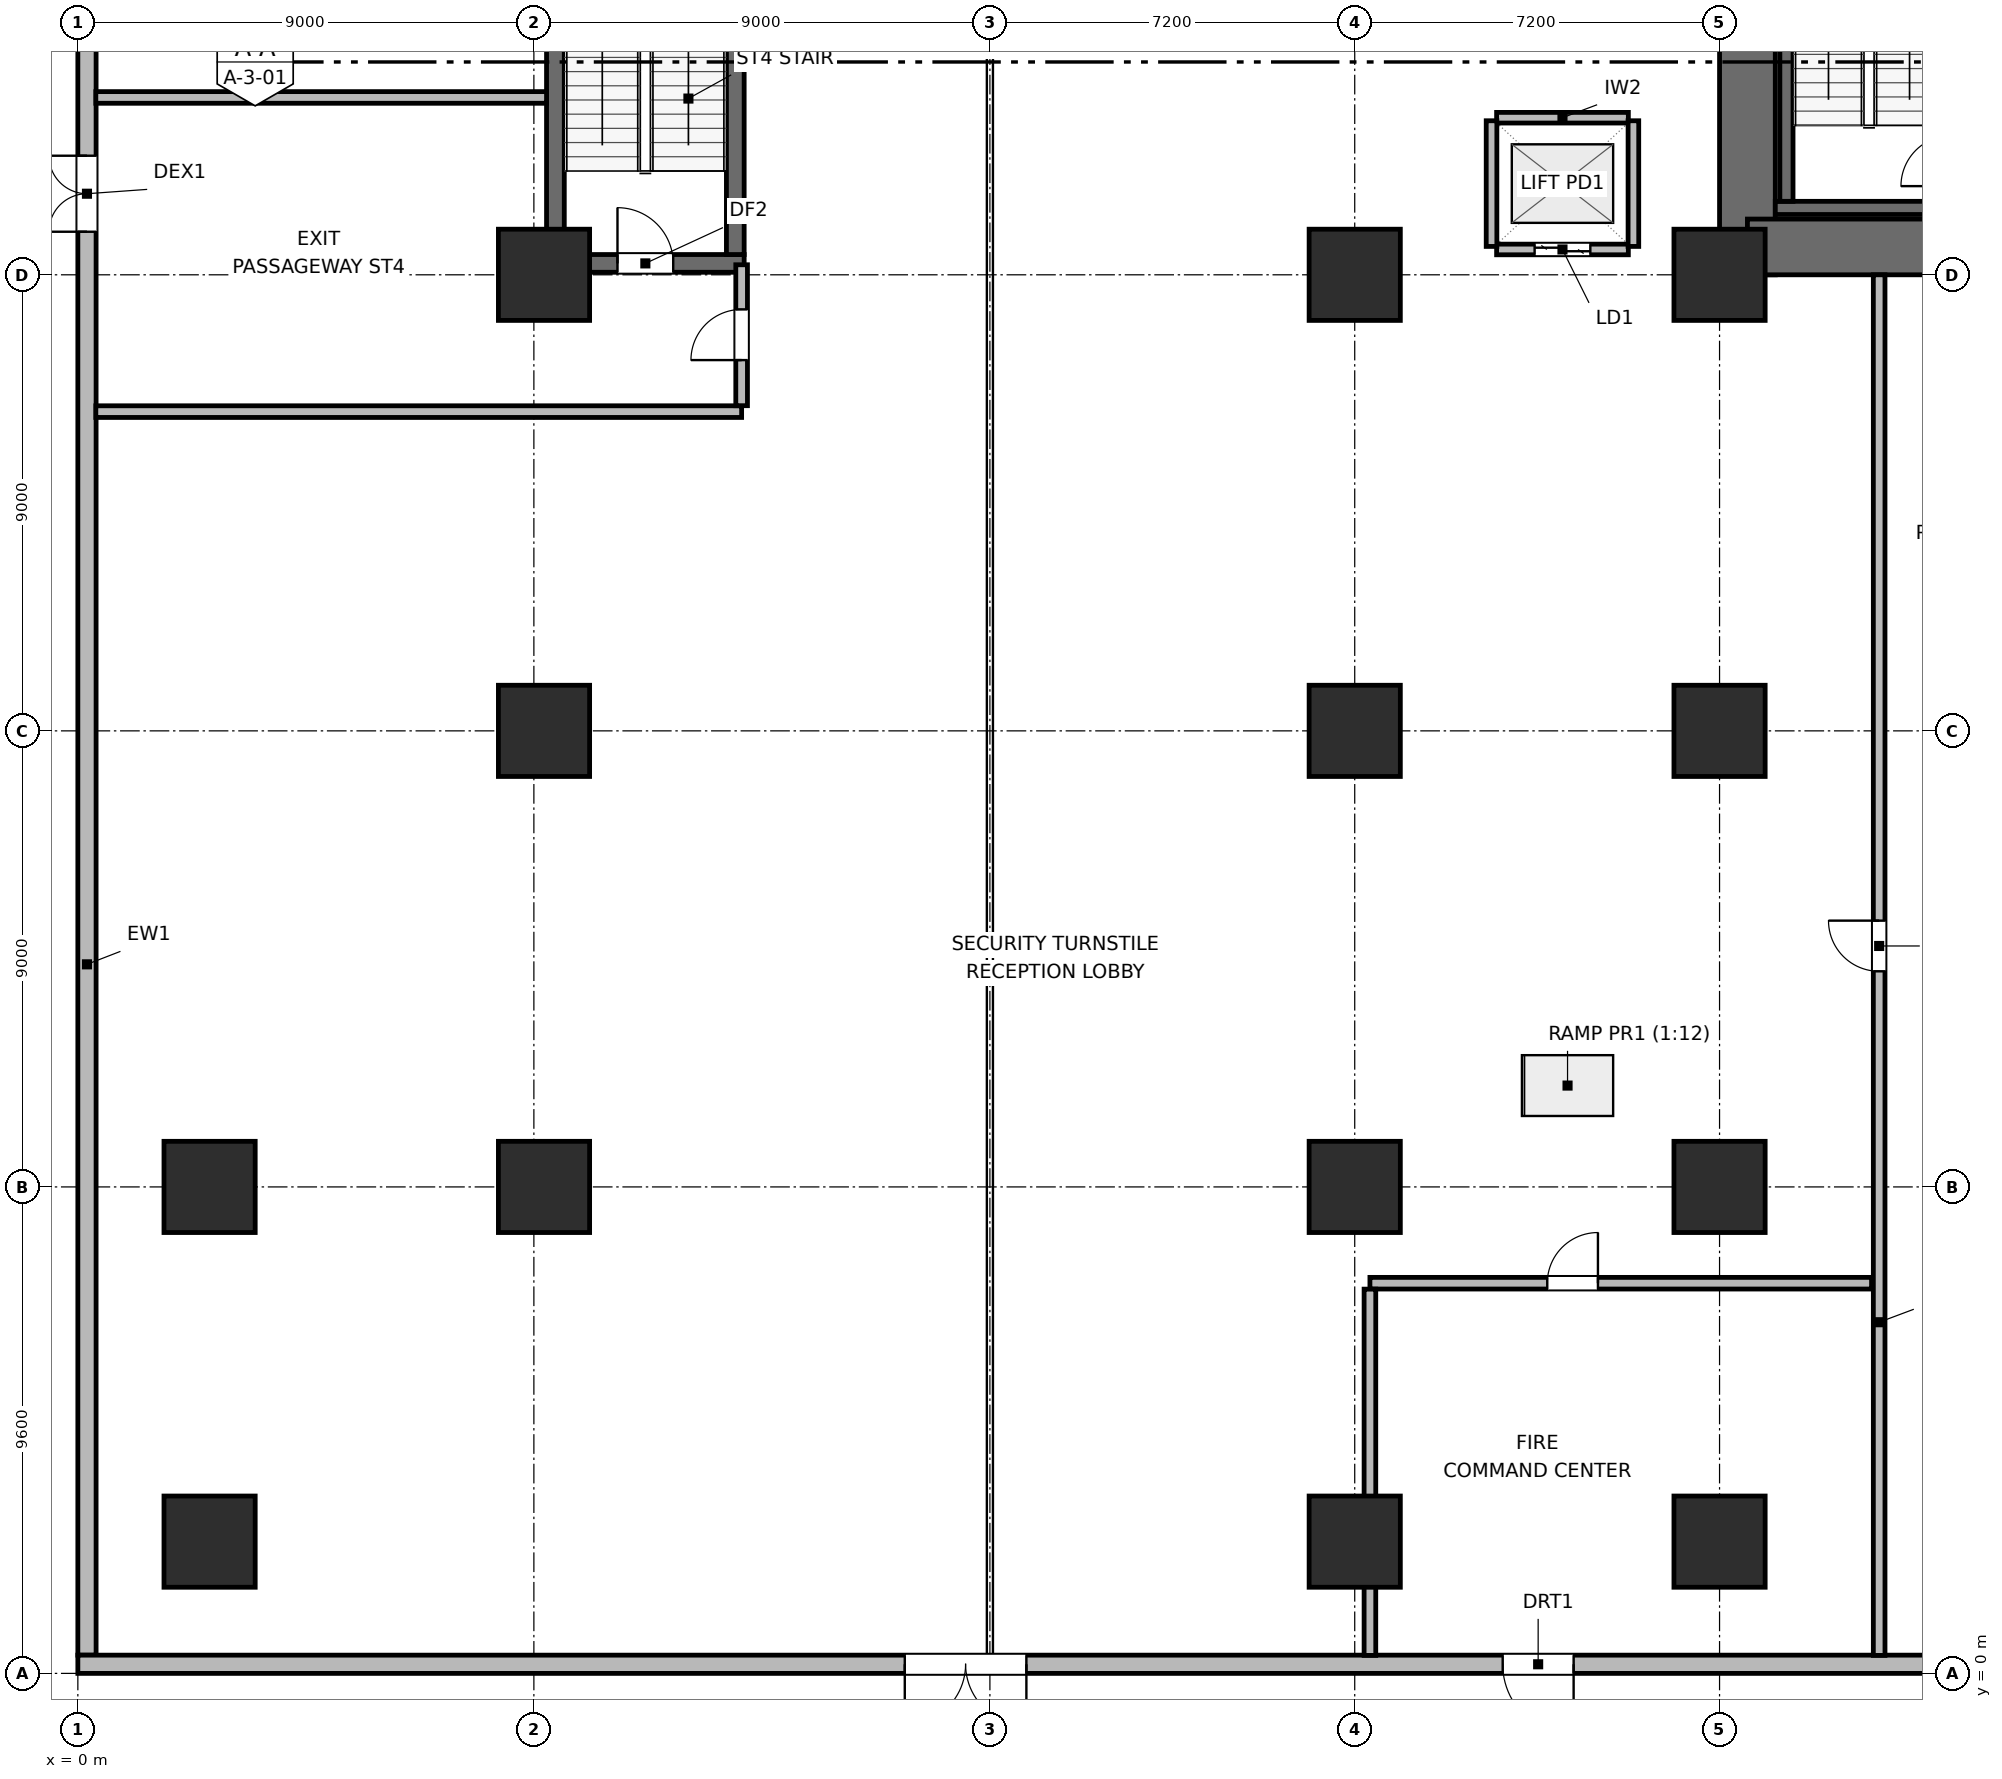
"""IFC4 building model, lengths in metres.
Left out: names, types, materials, properties, quantities, classifications, styles, units other than length and angle.
Written with IfcOpenShell. Run it as: python <this file> out.ifc"""

import sys

from ifc_helpers import new_model, si_unit, direction, frame, frame_2d, origin, origin_2d, place, context, subcontext, project, spatial, rectangle, extrude, element, fill, save


model = new_model("IFC4")
c1 = context("Model", 3, precision=1e-05, world=origin(), true_north=direction((0.0, 1.0)))
c2 = subcontext(c1, "Body", "Model", "MODEL_VIEW")
j1 = project(units=[si_unit("LENGTHUNIT", "METRE"), si_unit("PLANEANGLEUNIT", "RADIAN")], contexts=[c1])
p1 = place(None, origin())
s1 = spatial("IfcSite", under=j1, at=p1, CompositionType="ELEMENT")
p2 = place(p1, origin())
s2 = spatial("IfcBuilding", under=s1, at=p2, CompositionType="ELEMENT")
p3 = place(p2, origin())
s3 = spatial("IfcBuildingStorey", under=s2, at=p3, CompositionType="ELEMENT", Elevation=0.0)
p4 = place(p3, frame((32.95, 27.6, 0.0), z_axis=(0.0, 0.0, 1.0), x_axis=(0.0, 1.0, 0.0)))
e1 = element("IfcWall", 1, at=p4, inside=s3, PredefinedType="SHEAR", context=c2, shape_type="SweptSolid", body=[
    extrude(rectangle(XDim=16.8, YDim=1.1, at=frame_2d((8.4, 0.0))), origin(), (0.0, 0.0, 1.0), 4.5),
])
p5 = place(p3, frame((32.95, 28.15, 0.0), z_axis=(0.0, 0.0, 1.0), x_axis=(1.0, 0.0, 0.0)))
e2 = element("IfcWall", 2, at=p5, inside=s3, PredefinedType="SHEAR", context=c2, shape_type="SweptSolid", body=[
    extrude(rectangle(XDim=8.9, YDim=1.1, at=frame_2d((4.45, 0.0))), origin(), (0.0, 0.0, 1.0), 4.5),
])
p6 = place(p5, frame((4.9, 0.0, 0.0)))
e3 = element("IfcOpeningElement", 3, at=p6, cuts=e2, PredefinedType="OPENING", context=c2, shape_type="SweptSolid", body=[
    extrude(rectangle(XDim=1.05, YDim=2.04, at=frame_2d((0.525, 1.02))), frame((0.0, 0.56, 0.0), z_axis=(0.0, -1.0, 0.0), x_axis=(1.0, 0.0, 0.0)), (0.0, 0.0, 1.0), 1.12),
])
p7 = place(p3, frame((33.5, 28.92, 0.0), z_axis=(0.0, 0.0, 1.0), x_axis=(1.0, 0.0, 0.0)))
e4 = element("IfcWall", 4, at=p7, inside=s3, PredefinedType="SHEAR", context=c2, shape_type="SweptSolid", body=[
    extrude(rectangle(XDim=3.61, YDim=0.26, at=frame_2d((1.805, 0.0))), origin(), (0.0, 0.0, 1.0), 4.5),
])
p8 = place(p3, frame((33.72, 29.05, 0.0), z_axis=(0.0, 0.0, 1.0), x_axis=(0.0, 1.0, 0.0)))
e5 = element("IfcWall", 5, at=p8, inside=s3, PredefinedType="SHEAR", context=c2, shape_type="SweptSolid", body=[
    extrude(rectangle(XDim=7.6, YDim=0.26, at=frame_2d((3.8, 0.0))), origin(), (0.0, 0.0, 1.0), 4.5),
])
p9 = place(p3, frame((9.25, 27.825, 0.0), z_axis=(0.0, 0.0, 1.0), x_axis=(1.0, 0.0, 0.0)))
e6 = element("IfcWall", 6, at=p9, inside=s3, PredefinedType="SHEAR", context=c2, shape_type="SweptSolid", body=[
    extrude(rectangle(XDim=3.9, YDim=0.35, at=frame_2d((1.95, 0.0))), origin(), (0.0, 0.0, 1.0), 4.5),
])
p10 = place(p9, frame((1.4, 0.0, 0.0)))
e7 = element("IfcOpeningElement", 7, at=p10, cuts=e6, PredefinedType="OPENING", context=c2, shape_type="SweptSolid", body=[
    extrude(rectangle(XDim=1.1, YDim=2.05, at=frame_2d((0.55, 1.025))), frame((0.0, 0.185, 0.0), z_axis=(0.0, -1.0, 0.0), x_axis=(1.0, 0.0, 0.0)), (0.0, 0.0, 1.0), 0.37),
])
for number, where, z_axis, x_axis in (
    (8, (9.425, 28.0, 0.0), (0.0, 0.0, 1.0), (0.0, 1.0, 0.0)),
    (9, (12.975, 28.0, 0.0), (0.0, 0.0, 1.0), (0.0, 1.0, 0.0)),
):
    element("IfcWall", number, at=place(p3, frame(where, z_axis=z_axis, x_axis=x_axis)), inside=s3, PredefinedType="SHEAR", context=c2, shape_type="SweptSolid", body=[
        extrude(rectangle(XDim=8.4, YDim=0.35, at=frame_2d((4.2, 0.0))), origin(), (0.0, 0.0, 1.0), 4.5),
    ])
for number, where, z_axis, x_axis in (
    (10, (2.6, 2.6, 0.0), (0.0, 0.0, 1.0), (1.0, 0.0, 0.0)),
    (11, (2.6, 9.6, 0.0), (0.0, 0.0, 1.0), (1.0, 0.0, 0.0)),
    (12, (9.2, 9.6, 0.0), (0.0, 0.0, 1.0), (1.0, 0.0, 0.0)),
    (13, (9.2, 18.6, 0.0), (0.0, 0.0, 1.0), (1.0, 0.0, 0.0)),
    (14, (9.2, 27.6, 0.0), (0.0, 0.0, 1.0), (1.0, 0.0, 0.0)),
    (15, (25.2, 2.6, 0.0), (0.0, 0.0, 1.0), (1.0, 0.0, 0.0)),
    (16, (25.2, 9.6, 0.0), (0.0, 0.0, 1.0), (1.0, 0.0, 0.0)),
    (17, (25.2, 18.6, 0.0), (0.0, 0.0, 1.0), (1.0, 0.0, 0.0)),
    (18, (25.2, 27.6, 0.0), (0.0, 0.0, 1.0), (1.0, 0.0, 0.0)),
    (19, (32.4, 2.6, 0.0), (0.0, 0.0, 1.0), (1.0, 0.0, 0.0)),
    (20, (32.4, 9.6, 0.0), (0.0, 0.0, 1.0), (1.0, 0.0, 0.0)),
    (21, (32.4, 18.6, 0.0), (0.0, 0.0, 1.0), (1.0, 0.0, 0.0)),
    (22, (32.4, 27.6, 0.0), (0.0, 0.0, 1.0), (1.0, 0.0, 0.0)),
):
    element("IfcColumn", number, at=place(p3, frame(where, z_axis=z_axis, x_axis=x_axis)), inside=s3, PredefinedType="COLUMN", context=c2, shape_type="SweptSolid", body=[
        extrude(rectangle(XDim=1.8, YDim=1.8, at=origin_2d()), origin(), (0.0, 0.0, 1.0), 4.5),
    ])
p11 = place(p3, frame((0.18, 0.36, 0.0), z_axis=(0.0, 0.0, 1.0), x_axis=(0.0, 1.0, 0.0)))
e23 = element("IfcWall", 23, at=p11, inside=s3, PredefinedType="SOLIDWALL", context=c2, shape_type="SweptSolid", body=[
    extrude(rectangle(XDim=71.28, YDim=0.36, at=frame_2d((35.64, 0.0))), origin(), (0.0, 0.0, 1.0), 4.18),
])
p12 = place(p11, frame((28.09, 0.0, 0.0)))
e24 = element("IfcOpeningElement", 24, at=p12, cuts=e23, PredefinedType="OPENING", context=c2, shape_type="SweptSolid", body=[
    extrude(rectangle(XDim=1.5, YDim=2.15, at=frame_2d((0.75, 1.075))), frame((0.0, 0.19, 0.0), z_axis=(0.0, -1.0, 0.0), x_axis=(1.0, 0.0, 0.0)), (0.0, 0.0, 1.0), 0.38),
])
p13 = place(p3, frame((39.72, 0.18, 0.0), z_axis=(0.0, 0.0, 1.0), x_axis=(-1.0, 0.0, 0.0)))
e25 = element("IfcWall", 25, at=p13, inside=s3, PredefinedType="SOLIDWALL", context=c2, shape_type="SweptSolid", body=[
    extrude(rectangle(XDim=39.72, YDim=0.36, at=frame_2d((19.86, 0.0))), origin(), (0.0, 0.0, 1.0), 4.18),
])
p14 = place(p13, frame((1.2, 0.0, 0.0)))
e26 = element("IfcOpeningElement", 26, at=p14, cuts=e25, PredefinedType="OPENING", context=c2, shape_type="SweptSolid", body=[
    extrude(rectangle(XDim=1.5, YDim=2.15, at=frame_2d((0.75, 1.075))), frame((0.0, 0.19, 0.0), z_axis=(0.0, -1.0, 0.0), x_axis=(1.0, 0.0, 0.0)), (0.0, 0.0, 1.0), 0.38),
])
p15 = place(p13, frame((21.0, 0.0, 0.0)))
e27 = element("IfcOpeningElement", 27, at=p15, cuts=e25, PredefinedType="OPENING", context=c2, shape_type="SweptSolid", body=[
    extrude(rectangle(XDim=2.4, YDim=2.4, at=frame_2d((1.2, 1.2))), frame((0.0, 0.19, 0.0), z_axis=(0.0, -1.0, 0.0), x_axis=(1.0, 0.0, 0.0)), (0.0, 0.0, 1.0), 0.38),
])
p16 = place(p13, frame((10.2, 0.0, 0.0)))
e28 = element("IfcOpeningElement", 28, at=p16, cuts=e25, PredefinedType="OPENING", context=c2, shape_type="SweptSolid", body=[
    extrude(rectangle(XDim=1.4, YDim=2.15, at=frame_2d((0.7, 1.075))), frame((0.0, 0.19, 0.0), z_axis=(0.0, -1.0, 0.0), x_axis=(1.0, 0.0, 0.0)), (0.0, 0.0, 1.0), 0.38),
])
p17 = place(p3, frame((28.0, 28.1, 0.0), z_axis=(0.0, 0.0, 1.0), x_axis=(1.0, 0.0, 0.0)))
e29 = element("IfcWall", 29, at=p17, inside=s3, PredefinedType="PARTITIONING", context=c2, shape_type="SweptSolid", body=[
    extrude(rectangle(XDim=2.6, YDim=0.21, at=frame_2d((1.3, 0.0))), origin(), (0.0, 0.0, 1.0), 4.18),
])
p18 = place(p17, frame((0.75, 0.0, 0.0)))
e30 = element("IfcOpeningElement", 30, at=p18, cuts=e29, PredefinedType="OPENING", context=c2, shape_type="SweptSolid", body=[
    extrude(rectangle(XDim=1.1, YDim=2.04, at=frame_2d((0.55, 1.02))), frame((0.0, 0.115, 0.0), z_axis=(0.0, -1.0, 0.0), x_axis=(1.0, 0.0, 0.0)), (0.0, 0.0, 1.0), 0.23),
])
p19 = place(p3, frame((28.0, 30.7, 0.0), z_axis=(0.0, 0.0, 1.0), x_axis=(1.0, 0.0, 0.0)))
e31 = element("IfcWall", 31, at=p19, inside=s3, PredefinedType="PARTITIONING", context=c2, shape_type="SweptSolid", body=[
    extrude(rectangle(XDim=2.6, YDim=0.21, at=frame_2d((1.3, 0.0))), origin(), (0.0, 0.0, 1.0), 4.18),
])
for number, where, z_axis, x_axis in (
    (32, (27.9, 28.16, 0.0), (0.0, 0.0, 1.0), (0.0, 1.0, 0.0)),
    (33, (30.7, 28.16, 0.0), (0.0, 0.0, 1.0), (0.0, 1.0, 0.0)),
):
    element("IfcWall", number, at=place(p3, frame(where, z_axis=z_axis, x_axis=x_axis)), inside=s3, PredefinedType="PARTITIONING", context=c2, shape_type="SweptSolid", body=[
        extrude(rectangle(XDim=2.48, YDim=0.21, at=frame_2d((1.24, 0.0))), origin(), (0.0, 0.0, 1.0), 4.18),
    ])
p20 = place(p3, frame((35.55, 0.355, 0.0), z_axis=(0.0, 0.0, 1.0), x_axis=(0.0, 1.0, 0.0)))
e34 = element("IfcWall", 34, at=p20, inside=s3, PredefinedType="PARTITIONING", context=c2, shape_type="SweptSolid", body=[
    extrude(rectangle(XDim=27.245, YDim=0.23, at=frame_2d((13.623, 0.0))), origin(), (0.0, 0.0, 1.0), 4.18),
])
p21 = place(p20, frame((13.5, 0.0, 0.0)))
e35 = element("IfcOpeningElement", 35, at=p21, cuts=e34, PredefinedType="OPENING", context=c2, shape_type="SweptSolid", body=[
    extrude(rectangle(XDim=1.0, YDim=2.04, at=frame_2d((0.5, 1.02))), frame((0.0, 0.125, 0.0), z_axis=(0.0, -1.0, 0.0), x_axis=(1.0, 0.0, 0.0)), (0.0, 0.0, 1.0), 0.25),
])
p22 = place(p3, frame((0.355, 24.9, 0.0), z_axis=(0.0, 0.0, 1.0), x_axis=(1.0, 0.0, 0.0)))
e36 = element("IfcWall", 36, at=p22, inside=s3, PredefinedType="PARTITIONING", context=c2, shape_type="SweptSolid", body=[
    extrude(rectangle(XDim=12.745, YDim=0.23, at=frame_2d((6.373, 0.0))), origin(), (0.0, 0.0, 1.0), 4.18),
])
p23 = place(p3, frame((13.1, 25.017, 0.0), z_axis=(0.0, 0.0, 1.0), x_axis=(0.0, 1.0, 0.0)))
e37 = element("IfcWall", 37, at=p23, inside=s3, PredefinedType="PARTITIONING", context=c2, shape_type="SweptSolid", body=[
    extrude(rectangle(XDim=2.781, YDim=0.23, at=frame_2d((1.391, 0.0))), origin(), (0.0, 0.0, 1.0), 4.18),
])
p24 = place(p23, frame((0.9, 0.0, 0.0)))
e38 = element("IfcOpeningElement", 38, at=p24, cuts=e37, PredefinedType="OPENING", context=c2, shape_type="SweptSolid", body=[
    extrude(rectangle(XDim=1.0, YDim=2.04, at=frame_2d((0.5, 1.02))), frame((0.0, 0.125, 0.0), z_axis=(0.0, -1.0, 0.0), x_axis=(1.0, 0.0, 0.0)), (0.0, 0.0, 1.0), 0.25),
])
p25 = place(p3, frame((0.355, 31.1, 0.0), z_axis=(0.0, 0.0, 1.0), x_axis=(1.0, 0.0, 0.0)))
e39 = element("IfcWall", 39, at=p25, inside=s3, PredefinedType="PARTITIONING", context=c2, shape_type="SweptSolid", body=[
    extrude(rectangle(XDim=8.895, YDim=0.23, at=frame_2d((4.448, 0.0))), origin(), (0.0, 0.0, 1.0), 4.18),
])
p26 = place(p3, frame((25.5, 7.7, 0.0), z_axis=(0.0, 0.0, 1.0), x_axis=(1.0, 0.0, 0.0)))
e40 = element("IfcWall", 40, at=p26, inside=s3, PredefinedType="PARTITIONING", context=c2, shape_type="SweptSolid", body=[
    extrude(rectangle(XDim=9.9, YDim=0.23, at=frame_2d((4.95, 0.0))), origin(), (0.0, 0.0, 1.0), 4.18),
])
p27 = place(p26, frame((3.5, 0.0, 0.0)))
e41 = element("IfcOpeningElement", 41, at=p27, cuts=e40, PredefinedType="OPENING", context=c2, shape_type="SweptSolid", body=[
    extrude(rectangle(XDim=1.0, YDim=2.04, at=frame_2d((0.5, 1.02))), frame((0.0, 0.125, 0.0), z_axis=(0.0, -1.0, 0.0), x_axis=(1.0, 0.0, 0.0)), (0.0, 0.0, 1.0), 0.25),
])
p28 = place(p3, frame((25.5, 0.355, 0.0), z_axis=(0.0, 0.0, 1.0), x_axis=(0.0, 1.0, 0.0)))
e42 = element("IfcWall", 42, at=p28, inside=s3, PredefinedType="PARTITIONING", context=c2, shape_type="SweptSolid", body=[
    extrude(rectangle(XDim=7.228, YDim=0.23, at=frame_2d((3.614, 0.0))), origin(), (0.0, 0.0, 1.0), 3.392),
])
p29 = place(p12, origin())
e43 = element("IfcDoor", 43, at=p29, inside=s3, OperationType="DOUBLE_DOOR_SINGLE_SWING", PredefinedType="DOOR", context=c2, shape_type="SweptSolid", body=[
    extrude(rectangle(XDim=1.5, YDim=2.15, at=frame_2d((0.75, 1.075))), frame((0.0, 0.025, 0.0), z_axis=(0.0, -1.0, 0.0), x_axis=(1.0, 0.0, 0.0)), (0.0, 0.0, 1.0), 0.05),
])
fill(e24, e43)
p30 = place(p15, origin())
e44 = element("IfcDoor", 44, at=p30, inside=s3, OperationType="DOUBLE_DOOR_SINGLE_SWING", PredefinedType="DOOR", context=c2, shape_type="SweptSolid", body=[
    extrude(rectangle(XDim=2.4, YDim=2.4, at=frame_2d((1.2, 1.2))), frame((0.0, 0.025, 0.0), z_axis=(0.0, -1.0, 0.0), x_axis=(1.0, 0.0, 0.0)), (0.0, 0.0, 1.0), 0.05),
])
fill(e27, e44)
p31 = place(p16, origin())
e45 = element("IfcDoor", 45, at=p31, inside=s3, OperationType="SINGLE_SWING_LEFT", PredefinedType="DOOR", context=c2, shape_type="SweptSolid", body=[
    extrude(rectangle(XDim=1.4, YDim=2.15, at=frame_2d((0.7, 1.075))), frame((0.0, 0.025, 0.0), z_axis=(0.0, -1.0, 0.0), x_axis=(1.0, 0.0, 0.0)), (0.0, 0.0, 1.0), 0.05),
])
fill(e28, e45)
p32 = place(p10, origin())
e46 = element("IfcDoor", 46, at=p32, inside=s3, OperationType="SINGLE_SWING_LEFT", PredefinedType="DOOR", context=c2, shape_type="SweptSolid", body=[
    extrude(rectangle(XDim=1.1, YDim=2.05, at=frame_2d((0.55, 1.025))), frame((0.0, 0.025, 0.0), z_axis=(0.0, -1.0, 0.0), x_axis=(1.0, 0.0, 0.0)), (0.0, 0.0, 1.0), 0.05),
])
fill(e7, e46)
p33 = place(p18, origin())
e47 = element("IfcDoor", 47, at=p33, inside=s3, OperationType="DOUBLE_DOOR_SLIDING", PredefinedType="DOOR", context=c2, shape_type="SweptSolid", body=[
    extrude(rectangle(XDim=1.1, YDim=2.04, at=frame_2d((0.55, 1.02))), frame((0.0, 0.025, 0.0), z_axis=(0.0, -1.0, 0.0), x_axis=(1.0, 0.0, 0.0)), (0.0, 0.0, 1.0), 0.05),
])
fill(e30, e47)
p34 = place(p21, origin())
e48 = element("IfcDoor", 48, at=p34, inside=s3, OperationType="SINGLE_SWING_RIGHT", PredefinedType="DOOR", context=c2, shape_type="SweptSolid", body=[
    extrude(rectangle(XDim=1.0, YDim=2.04, at=frame_2d((0.5, 1.02))), frame((0.0, 0.025, 0.0), z_axis=(0.0, -1.0, 0.0), x_axis=(1.0, 0.0, 0.0)), (0.0, 0.0, 1.0), 0.05),
])
fill(e35, e48)
p35 = place(p24, origin())
e49 = element("IfcDoor", 49, at=p35, inside=s3, OperationType="SINGLE_SWING_LEFT", PredefinedType="DOOR", context=c2, shape_type="SweptSolid", body=[
    extrude(rectangle(XDim=1.0, YDim=2.04, at=frame_2d((0.5, 1.02))), frame((0.0, 0.025, 0.0), z_axis=(0.0, -1.0, 0.0), x_axis=(1.0, 0.0, 0.0)), (0.0, 0.0, 1.0), 0.05),
])
fill(e38, e49)
p36 = place(p27, origin())
e50 = element("IfcDoor", 50, at=p36, inside=s3, OperationType="SINGLE_SWING_RIGHT", PredefinedType="DOOR", context=c2, shape_type="SweptSolid", body=[
    extrude(rectangle(XDim=1.0, YDim=2.04, at=frame_2d((0.5, 1.02))), frame((0.0, 0.025, 0.0), z_axis=(0.0, -1.0, 0.0), x_axis=(1.0, 0.0, 0.0)), (0.0, 0.0, 1.0), 0.05),
])
fill(e41, e50)
save(model, sys.argv[1])
